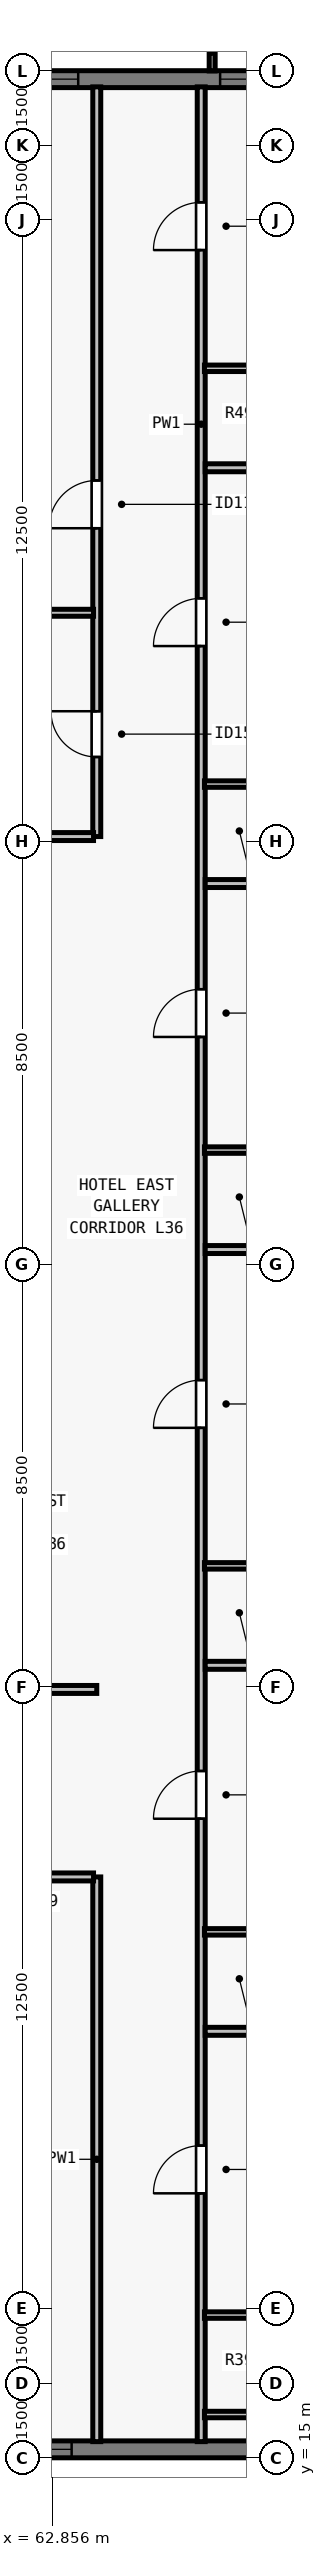
"""IFC4 building model, lengths in metres.
Left out: names, types, materials, properties, quantities, classifications, styles, units other than length and angle.
Written with IfcOpenShell. Run it as: python <this file> out.ifc"""

import sys

from ifc_helpers import new_model, si_unit, direction, frame, frame_2d, origin, place, context, subcontext, project, spatial, rectangle, extrude, element, fill, save


model = new_model("IFC4")
c1 = context("Model", 3, precision=1e-05, world=origin(), true_north=direction((0.0, 1.0)))
c2 = subcontext(c1, "Body", "Model", "MODEL_VIEW")
j1 = project(units=[si_unit("LENGTHUNIT", "METRE"), si_unit("PLANEANGLEUNIT", "RADIAN")], contexts=[c1])
p1 = place(None, origin())
s1 = spatial("IfcSite", under=j1, at=p1, CompositionType="ELEMENT")
p2 = place(p1, origin())
s2 = spatial("IfcBuilding", under=s1, at=p2, CompositionType="ELEMENT")
p3 = place(p2, frame((0.0, 0.0, 134.0)))
s3 = spatial("IfcBuildingStorey", under=s2, at=p3, CompositionType="ELEMENT", Elevation=134.0)
p4 = place(p3, frame((32.0, 62.83, 0.0), z_axis=(0.0, 0.0, 1.0), x_axis=(1.0, 0.0, 0.0)))
e1 = element("IfcWall", 1, at=p4, inside=s3, PredefinedType="SOLIDWALL", context=c2, shape_type="SweptSolid", body=[
    extrude(rectangle(XDim=39.682, YDim=0.34, at=frame_2d((19.841, 0.0))), origin(), (0.0, 0.0, 1.0), 3.28),
])
p5 = place(p4, frame((4.952, 0.0, 0.8)))
e2 = element("IfcOpeningElement", 2, at=p5, cuts=e1, PredefinedType="OPENING", context=c2, shape_type="SweptSolid", body=[
    extrude(rectangle(XDim=1.35, YDim=1.66, at=frame_2d((0.675, 0.83))), frame((0.0, 0.18, 0.0), z_axis=(0.0, -1.0, 0.0), x_axis=(1.0, 0.0, 0.0)), (0.0, 0.0, 1.0), 0.36),
])
p6 = place(p4, frame((12.059, 0.0, 0.8)))
e3 = element("IfcOpeningElement", 3, at=p6, cuts=e1, PredefinedType="OPENING", context=c2, shape_type="SweptSolid", body=[
    extrude(rectangle(XDim=1.35, YDim=1.66, at=frame_2d((0.675, 0.83))), frame((0.0, 0.18, 0.0), z_axis=(0.0, -1.0, 0.0), x_axis=(1.0, 0.0, 0.0)), (0.0, 0.0, 1.0), 0.36),
])
p7 = place(p4, frame((16.262, 0.0, 0.8)))
e4 = element("IfcOpeningElement", 4, at=p7, cuts=e1, PredefinedType="OPENING", context=c2, shape_type="SweptSolid", body=[
    extrude(rectangle(XDim=1.75, YDim=1.66, at=frame_2d((0.875, 0.83))), frame((0.0, 0.18, 0.0), z_axis=(0.0, -1.0, 0.0), x_axis=(1.0, 0.0, 0.0)), (0.0, 0.0, 1.0), 0.36),
])
p8 = place(p4, frame((19.166, 0.0, 0.8)))
e5 = element("IfcOpeningElement", 5, at=p8, cuts=e1, PredefinedType="OPENING", context=c2, shape_type="SweptSolid", body=[
    extrude(rectangle(XDim=1.35, YDim=1.66, at=frame_2d((0.675, 0.83))), frame((0.0, 0.18, 0.0), z_axis=(0.0, -1.0, 0.0), x_axis=(1.0, 0.0, 0.0)), (0.0, 0.0, 1.0), 0.36),
])
p9 = place(p4, frame((22.07, 0.0, 0.8)))
e6 = element("IfcOpeningElement", 6, at=p9, cuts=e1, PredefinedType="OPENING", context=c2, shape_type="SweptSolid", body=[
    extrude(rectangle(XDim=1.75, YDim=1.66, at=frame_2d((0.875, 0.83))), frame((0.0, 0.18, 0.0), z_axis=(0.0, -1.0, 0.0), x_axis=(1.0, 0.0, 0.0)), (0.0, 0.0, 1.0), 0.36),
])
p10 = place(p4, frame((26.273, 0.0, 0.8)))
e7 = element("IfcOpeningElement", 7, at=p10, cuts=e1, PredefinedType="OPENING", context=c2, shape_type="SweptSolid", body=[
    extrude(rectangle(XDim=1.35, YDim=1.66, at=frame_2d((0.675, 0.83))), frame((0.0, 0.18, 0.0), z_axis=(0.0, -1.0, 0.0), x_axis=(1.0, 0.0, 0.0)), (0.0, 0.0, 1.0), 0.36),
])
p11 = place(p4, frame((29.627, 0.0, 0.8)))
e8 = element("IfcOpeningElement", 8, at=p11, cuts=e1, PredefinedType="OPENING", context=c2, shape_type="SweptSolid", body=[
    extrude(rectangle(XDim=1.75, YDim=1.66, at=frame_2d((0.875, 0.83))), frame((0.0, 0.18, 0.0), z_axis=(0.0, -1.0, 0.0), x_axis=(1.0, 0.0, 0.0)), (0.0, 0.0, 1.0), 0.36),
])
p12 = place(p4, frame((34.23, 0.0, 0.8)))
e9 = element("IfcOpeningElement", 9, at=p12, cuts=e1, PredefinedType="OPENING", context=c2, shape_type="SweptSolid", body=[
    extrude(rectangle(XDim=1.35, YDim=1.66, at=frame_2d((0.675, 0.83))), frame((0.0, 0.18, 0.0), z_axis=(0.0, -1.0, 0.0), x_axis=(1.0, 0.0, 0.0)), (0.0, 0.0, 1.0), 0.36),
])
p13 = place(p3, frame((72.0, 15.17, 0.0), z_axis=(0.0, 0.0, 1.0), x_axis=(-1.0, 0.0, 0.0)))
e10 = element("IfcWall", 10, at=p13, inside=s3, PredefinedType="SOLIDWALL", context=c2, shape_type="SweptSolid", body=[
    extrude(rectangle(XDim=39.682, YDim=0.34, at=frame_2d((19.841, 0.0))), origin(), (0.0, 0.0, 1.0), 3.28),
])
p14 = place(p13, frame((8.755, 0.0, 0.8)))
e11 = element("IfcOpeningElement", 11, at=p14, cuts=e10, PredefinedType="OPENING", context=c2, shape_type="SweptSolid", body=[
    extrude(rectangle(XDim=1.75, YDim=1.66, at=frame_2d((0.875, 0.83))), frame((0.0, 0.18, 0.0), z_axis=(0.0, -1.0, 0.0), x_axis=(1.0, 0.0, 0.0)), (0.0, 0.0, 1.0), 0.36),
])
p15 = place(p13, frame((12.059, 0.0, 0.8)))
e12 = element("IfcOpeningElement", 12, at=p15, cuts=e10, PredefinedType="OPENING", context=c2, shape_type="SweptSolid", body=[
    extrude(rectangle(XDim=1.35, YDim=1.66, at=frame_2d((0.675, 0.83))), frame((0.0, 0.18, 0.0), z_axis=(0.0, -1.0, 0.0), x_axis=(1.0, 0.0, 0.0)), (0.0, 0.0, 1.0), 0.36),
])
p16 = place(p13, frame((16.262, 0.0, 0.8)))
e13 = element("IfcOpeningElement", 13, at=p16, cuts=e10, PredefinedType="OPENING", context=c2, shape_type="SweptSolid", body=[
    extrude(rectangle(XDim=1.75, YDim=1.66, at=frame_2d((0.875, 0.83))), frame((0.0, 0.18, 0.0), z_axis=(0.0, -1.0, 0.0), x_axis=(1.0, 0.0, 0.0)), (0.0, 0.0, 1.0), 0.36),
])
p17 = place(p13, frame((19.166, 0.0, 0.8)))
e14 = element("IfcOpeningElement", 14, at=p17, cuts=e10, PredefinedType="OPENING", context=c2, shape_type="SweptSolid", body=[
    extrude(rectangle(XDim=1.35, YDim=1.66, at=frame_2d((0.675, 0.83))), frame((0.0, 0.18, 0.0), z_axis=(0.0, -1.0, 0.0), x_axis=(1.0, 0.0, 0.0)), (0.0, 0.0, 1.0), 0.36),
])
p18 = place(p13, frame((21.27, 0.0, 0.8)))
e15 = element("IfcOpeningElement", 15, at=p18, cuts=e10, PredefinedType="OPENING", context=c2, shape_type="SweptSolid", body=[
    extrude(rectangle(XDim=1.75, YDim=1.66, at=frame_2d((0.875, 0.83))), frame((0.0, 0.18, 0.0), z_axis=(0.0, -1.0, 0.0), x_axis=(1.0, 0.0, 0.0)), (0.0, 0.0, 1.0), 0.36),
])
p19 = place(p13, frame((26.273, 0.0, 0.8)))
e16 = element("IfcOpeningElement", 16, at=p19, cuts=e10, PredefinedType="OPENING", context=c2, shape_type="SweptSolid", body=[
    extrude(rectangle(XDim=1.35, YDim=1.66, at=frame_2d((0.675, 0.83))), frame((0.0, 0.18, 0.0), z_axis=(0.0, -1.0, 0.0), x_axis=(1.0, 0.0, 0.0)), (0.0, 0.0, 1.0), 0.36),
])
p20 = place(p13, frame((28.377, 0.0, 0.8)))
e17 = element("IfcOpeningElement", 17, at=p20, cuts=e10, PredefinedType="OPENING", context=c2, shape_type="SweptSolid", body=[
    extrude(rectangle(XDim=1.75, YDim=1.66, at=frame_2d((0.875, 0.83))), frame((0.0, 0.18, 0.0), z_axis=(0.0, -1.0, 0.0), x_axis=(1.0, 0.0, 0.0)), (0.0, 0.0, 1.0), 0.36),
])
p21 = place(p13, frame((32.93, 0.0, 0.8)))
e18 = element("IfcOpeningElement", 18, at=p21, cuts=e10, PredefinedType="OPENING", context=c2, shape_type="SweptSolid", body=[
    extrude(rectangle(XDim=1.35, YDim=1.66, at=frame_2d((0.675, 0.83))), frame((0.0, 0.18, 0.0), z_axis=(0.0, -1.0, 0.0), x_axis=(1.0, 0.0, 0.0)), (0.0, 0.0, 1.0), 0.36),
])
p22 = place(p3, frame((65.85, 15.325, 0.0), z_axis=(0.0, 0.0, 1.0), x_axis=(0.0, 1.0, 0.0)))
e19 = element("IfcWall", 19, at=p22, inside=s3, PredefinedType="PARTITIONING", context=c2, shape_type="SweptSolid", body=[
    extrude(rectangle(XDim=47.35, YDim=0.16, at=frame_2d((23.675, 0.0))), origin(), (0.0, 0.0, 1.0), 2.555),
])
p23 = place(p22, frame((4.993, 0.0, 0.0)))
e20 = element("IfcOpeningElement", 20, at=p23, cuts=e19, PredefinedType="OPENING", context=c2, shape_type="SweptSolid", body=[
    extrude(rectangle(XDim=0.96, YDim=2.15, at=frame_2d((0.48, 1.075))), frame((0.0, 0.09, 0.0), z_axis=(0.0, -1.0, 0.0), x_axis=(1.0, 0.0, 0.0)), (0.0, 0.0, 1.0), 0.18),
])
p24 = place(p22, frame((12.525, 0.0, 0.0)))
e21 = element("IfcOpeningElement", 21, at=p24, cuts=e19, PredefinedType="OPENING", context=c2, shape_type="SweptSolid", body=[
    extrude(rectangle(XDim=0.96, YDim=2.15, at=frame_2d((0.48, 1.075))), frame((0.0, 0.09, 0.0), z_axis=(0.0, -1.0, 0.0), x_axis=(1.0, 0.0, 0.0)), (0.0, 0.0, 1.0), 0.18),
])
p25 = place(p22, frame((20.385, 0.0, 0.0)))
e22 = element("IfcOpeningElement", 22, at=p25, cuts=e19, PredefinedType="OPENING", context=c2, shape_type="SweptSolid", body=[
    extrude(rectangle(XDim=0.96, YDim=2.15, at=frame_2d((0.48, 1.075))), frame((0.0, 0.09, 0.0), z_axis=(0.0, -1.0, 0.0), x_axis=(1.0, 0.0, 0.0)), (0.0, 0.0, 1.0), 0.18),
])
p26 = place(p22, frame((28.246, 0.0, 0.0)))
e23 = element("IfcOpeningElement", 23, at=p26, cuts=e19, PredefinedType="OPENING", context=c2, shape_type="SweptSolid", body=[
    extrude(rectangle(XDim=0.96, YDim=2.15, at=frame_2d((0.48, 1.075))), frame((0.0, 0.09, 0.0), z_axis=(0.0, -1.0, 0.0), x_axis=(1.0, 0.0, 0.0)), (0.0, 0.0, 1.0), 0.18),
])
p27 = place(p22, frame((36.105, 0.0, 0.0)))
e24 = element("IfcOpeningElement", 24, at=p27, cuts=e19, PredefinedType="OPENING", context=c2, shape_type="SweptSolid", body=[
    extrude(rectangle(XDim=0.96, YDim=2.15, at=frame_2d((0.48, 1.075))), frame((0.0, 0.09, 0.0), z_axis=(0.0, -1.0, 0.0), x_axis=(1.0, 0.0, 0.0)), (0.0, 0.0, 1.0), 0.18),
])
p28 = place(p22, frame((44.068, 0.0, 0.0)))
e25 = element("IfcOpeningElement", 25, at=p28, cuts=e19, PredefinedType="OPENING", context=c2, shape_type="SweptSolid", body=[
    extrude(rectangle(XDim=0.96, YDim=2.15, at=frame_2d((0.48, 1.075))), frame((0.0, 0.09, 0.0), z_axis=(0.0, -1.0, 0.0), x_axis=(1.0, 0.0, 0.0)), (0.0, 0.0, 1.0), 0.18),
])
p29 = place(p3, frame((63.75, 15.325, 0.0), z_axis=(0.0, 0.0, 1.0), x_axis=(0.0, 1.0, 0.0)))
e26 = element("IfcWall", 26, at=p29, inside=s3, PredefinedType="PARTITIONING", context=c2, shape_type="SweptSolid", body=[
    extrude(rectangle(XDim=11.355, YDim=0.16, at=frame_2d((5.677, 0.0))), origin(), (0.0, 0.0, 1.0), 2.555),
])
p30 = place(p3, frame((63.75, 47.6, 0.0), z_axis=(0.0, 0.0, 1.0), x_axis=(0.0, 1.0, 0.0)))
e27 = element("IfcWall", 27, at=p30, inside=s3, PredefinedType="PARTITIONING", context=c2, shape_type="SweptSolid", body=[
    extrude(rectangle(XDim=15.075, YDim=0.16, at=frame_2d((7.538, 0.0))), origin(), (0.0, 0.0, 1.0), 2.555),
])
p31 = place(p30, frame((1.6, 0.0, 0.0)))
e28 = element("IfcOpeningElement", 28, at=p31, cuts=e27, PredefinedType="OPENING", context=c2, shape_type="SweptSolid", body=[
    extrude(rectangle(XDim=0.92, YDim=2.12, at=frame_2d((0.46, 1.06))), frame((0.0, 0.09, 0.0), z_axis=(0.0, -1.0, 0.0), x_axis=(1.0, 0.0, 0.0)), (0.0, 0.0, 1.0), 0.18),
])
p32 = place(p30, frame((6.2, 0.0, 0.0)))
e29 = element("IfcOpeningElement", 29, at=p32, cuts=e27, PredefinedType="OPENING", context=c2, shape_type="SweptSolid", body=[
    extrude(rectangle(XDim=0.96, YDim=2.12, at=frame_2d((0.48, 1.06))), frame((0.0, 0.09, 0.0), z_axis=(0.0, -1.0, 0.0), x_axis=(1.0, 0.0, 0.0)), (0.0, 0.0, 1.0), 0.18),
])
p33 = place(p3, frame((60.765, 30.45, 0.0), z_axis=(0.0, 0.0, 1.0), x_axis=(1.0, 0.0, 0.0)))
e30 = element("IfcWall", 30, at=p33, inside=s3, PredefinedType="PARTITIONING", context=c2, shape_type="SweptSolid", body=[
    extrude(rectangle(XDim=2.985, YDim=0.16, at=frame_2d((1.493, 0.0))), origin(), (0.0, 0.0, 1.0), 3.28),
])
p34 = place(p3, frame((60.765, 47.6, 0.0), z_axis=(0.0, 0.0, 1.0), x_axis=(1.0, 0.0, 0.0)))
e31 = element("IfcWall", 31, at=p34, inside=s3, PredefinedType="PARTITIONING", context=c2, shape_type="SweptSolid", body=[
    extrude(rectangle(XDim=2.92, YDim=0.16, at=frame_2d((1.46, 0.0))), origin(), (0.0, 0.0, 1.0), 3.28),
])
p35 = place(p3, frame((41.615, 26.68, 0.0), z_axis=(0.0, 0.0, 1.0), x_axis=(1.0, 0.0, 0.0)))
e32 = element("IfcWall", 32, at=p35, inside=s3, PredefinedType="PARTITIONING", context=c2, shape_type="SweptSolid", body=[
    extrude(rectangle(XDim=22.07, YDim=0.16, at=frame_2d((11.035, 0.0))), origin(), (0.0, 0.0, 1.0), 3.28),
])
p36 = place(p35, frame((4.281, 0.0, 0.0)))
e33 = element("IfcOpeningElement", 33, at=p36, cuts=e32, PredefinedType="OPENING", context=c2, shape_type="SweptSolid", body=[
    extrude(rectangle(XDim=0.96, YDim=2.15, at=frame_2d((0.48, 1.075))), frame((0.0, 0.09, 0.0), z_axis=(0.0, -1.0, 0.0), x_axis=(1.0, 0.0, 0.0)), (0.0, 0.0, 1.0), 0.18),
])
p37 = place(p35, frame((11.56, 0.0, 0.0)))
e34 = element("IfcOpeningElement", 34, at=p37, cuts=e32, PredefinedType="OPENING", context=c2, shape_type="SweptSolid", body=[
    extrude(rectangle(XDim=0.96, YDim=2.15, at=frame_2d((0.48, 1.075))), frame((0.0, 0.09, 0.0), z_axis=(0.0, -1.0, 0.0), x_axis=(1.0, 0.0, 0.0)), (0.0, 0.0, 1.0), 0.18),
])
p38 = place(p35, frame((19.134, 0.0, 0.0)))
e35 = element("IfcOpeningElement", 35, at=p38, cuts=e32, PredefinedType="OPENING", context=c2, shape_type="SweptSolid", body=[
    extrude(rectangle(XDim=0.96, YDim=2.15, at=frame_2d((0.48, 1.075))), frame((0.0, 0.09, 0.0), z_axis=(0.0, -1.0, 0.0), x_axis=(1.0, 0.0, 0.0)), (0.0, 0.0, 1.0), 0.18),
])
p39 = place(p3, frame((53.555, 52.1, 0.0), z_axis=(0.0, 0.0, 1.0), x_axis=(1.0, 0.0, 0.0)))
e36 = element("IfcWall", 36, at=p39, inside=s3, PredefinedType="PARTITIONING", context=c2, shape_type="SweptSolid", body=[
    extrude(rectangle(XDim=10.13, YDim=0.14, at=frame_2d((5.065, 0.0))), origin(), (0.0, 0.0, 1.0), 3.28),
])
for number, where, z_axis, x_axis in (
    (37, (65.915, 15.87, 0.0), (0.0, 0.0, 1.0), (1.0, 0.0, 0.0)),
    (38, (65.915, 17.87, 0.0), (0.0, 0.0, 1.0), (1.0, 0.0, 0.0)),
):
    element("IfcWall", number, at=place(p3, frame(where, z_axis=z_axis, x_axis=x_axis)), inside=s3, PredefinedType="PLUMBINGWALL", context=c2, shape_type="SweptSolid", body=[
        extrude(rectangle(XDim=2.315, YDim=0.13, at=frame_2d((1.157, 0.0))), origin(), (0.0, 0.0, 1.0), 3.28),
    ])
p40 = place(p3, frame((65.93, 23.576, 0.0), z_axis=(0.0, 0.0, 1.0), x_axis=(1.0, 0.0, 0.0)))
e39 = element("IfcWall", 39, at=p40, inside=s3, PredefinedType="PARTITIONING", context=c2, shape_type="SweptSolid", body=[
    extrude(rectangle(XDim=9.745, YDim=0.16, at=frame_2d((4.873, 0.0))), origin(), (0.0, 0.0, 1.0), 2.896),
])
p41 = place(p3, frame((65.915, 25.576, 0.0), z_axis=(0.0, 0.0, 1.0), x_axis=(1.0, 0.0, 0.0)))
e40 = element("IfcWall", 40, at=p41, inside=s3, PredefinedType="PLUMBINGWALL", context=c2, shape_type="SweptSolid", body=[
    extrude(rectangle(XDim=2.315, YDim=0.13, at=frame_2d((1.157, 0.0))), origin(), (0.0, 0.0, 1.0), 2.896),
])
p42 = place(p3, frame((65.93, 30.935, 0.0), z_axis=(0.0, 0.0, 1.0), x_axis=(1.0, 0.0, 0.0)))
e41 = element("IfcWall", 41, at=p42, inside=s3, PredefinedType="PARTITIONING", context=c2, shape_type="SweptSolid", body=[
    extrude(rectangle(XDim=9.745, YDim=0.16, at=frame_2d((4.873, 0.0))), origin(), (0.0, 0.0, 1.0), 3.28),
])
p43 = place(p3, frame((65.915, 32.935, 0.0), z_axis=(0.0, 0.0, 1.0), x_axis=(1.0, 0.0, 0.0)))
e42 = element("IfcWall", 42, at=p43, inside=s3, PredefinedType="PLUMBINGWALL", context=c2, shape_type="SweptSolid", body=[
    extrude(rectangle(XDim=2.315, YDim=0.13, at=frame_2d((1.157, 0.0))), origin(), (0.0, 0.0, 1.0), 3.28),
])
p44 = place(p3, frame((65.93, 39.296, 0.0), z_axis=(0.0, 0.0, 1.0), x_axis=(1.0, 0.0, 0.0)))
e43 = element("IfcWall", 43, at=p44, inside=s3, PredefinedType="PARTITIONING", context=c2, shape_type="SweptSolid", body=[
    extrude(rectangle(XDim=9.745, YDim=0.16, at=frame_2d((4.873, 0.0))), origin(), (0.0, 0.0, 1.0), 3.28),
])
p45 = place(p3, frame((65.915, 41.296, 0.0), z_axis=(0.0, 0.0, 1.0), x_axis=(1.0, 0.0, 0.0)))
e44 = element("IfcWall", 44, at=p45, inside=s3, PredefinedType="PLUMBINGWALL", context=c2, shape_type="SweptSolid", body=[
    extrude(rectangle(XDim=2.315, YDim=0.13, at=frame_2d((1.157, 0.0))), origin(), (0.0, 0.0, 1.0), 3.28),
])
p46 = place(p3, frame((65.93, 46.655, 0.0), z_axis=(0.0, 0.0, 1.0), x_axis=(1.0, 0.0, 0.0)))
e45 = element("IfcWall", 45, at=p46, inside=s3, PredefinedType="PARTITIONING", context=c2, shape_type="SweptSolid", body=[
    extrude(rectangle(XDim=9.745, YDim=0.16, at=frame_2d((4.873, 0.0))), origin(), (0.0, 0.0, 1.0), 3.28),
])
p47 = place(p3, frame((65.915, 48.655, 0.0), z_axis=(0.0, 0.0, 1.0), x_axis=(1.0, 0.0, 0.0)))
e46 = element("IfcWall", 46, at=p47, inside=s3, PredefinedType="PLUMBINGWALL", context=c2, shape_type="SweptSolid", body=[
    extrude(rectangle(XDim=2.315, YDim=0.13, at=frame_2d((1.157, 0.0))), origin(), (0.0, 0.0, 1.0), 3.28),
])
p48 = place(p3, frame((65.93, 55.016, 0.0), z_axis=(0.0, 0.0, 1.0), x_axis=(1.0, 0.0, 0.0)))
e47 = element("IfcWall", 47, at=p48, inside=s3, PredefinedType="PARTITIONING", context=c2, shape_type="SweptSolid", body=[
    extrude(rectangle(XDim=9.745, YDim=0.16, at=frame_2d((4.873, 0.0))), origin(), (0.0, 0.0, 1.0), 2.896),
])
p49 = place(p3, frame((65.915, 57.016, 0.0), z_axis=(0.0, 0.0, 1.0), x_axis=(1.0, 0.0, 0.0)))
e48 = element("IfcWall", 48, at=p49, inside=s3, PredefinedType="PLUMBINGWALL", context=c2, shape_type="SweptSolid", body=[
    extrude(rectangle(XDim=2.315, YDim=0.13, at=frame_2d((1.157, 0.0))), origin(), (0.0, 0.0, 1.0), 3.28),
])
p50 = place(p11, origin())
e49 = element("IfcWindow", 49, at=p50, inside=s3, PartitioningType="SINGLE_PANEL", PredefinedType="WINDOW", context=c2, shape_type="SweptSolid", body=[
    extrude(rectangle(XDim=1.75, YDim=1.66, at=frame_2d((0.875, 0.83))), frame((0.0, -0.05, 0.0), z_axis=(0.0, -1.0, 0.0), x_axis=(1.0, 0.0, 0.0)), (0.0, 0.0, 1.0), 0.06),
])
fill(e8, e49)
p51 = place(p12, origin())
e50 = element("IfcWindow", 50, at=p51, inside=s3, PartitioningType="SINGLE_PANEL", PredefinedType="WINDOW", context=c2, shape_type="SweptSolid", body=[
    extrude(rectangle(XDim=1.35, YDim=1.66, at=frame_2d((0.675, 0.83))), frame((0.0, -0.05, 0.0), z_axis=(0.0, -1.0, 0.0), x_axis=(1.0, 0.0, 0.0)), (0.0, 0.0, 1.0), 0.06),
])
fill(e9, e50)
p52 = place(p14, origin())
e51 = element("IfcWindow", 51, at=p52, inside=s3, PartitioningType="SINGLE_PANEL", PredefinedType="WINDOW", context=c2, shape_type="SweptSolid", body=[
    extrude(rectangle(XDim=1.75, YDim=1.66, at=frame_2d((0.875, 0.83))), frame((0.0, -0.05, 0.0), z_axis=(0.0, -1.0, 0.0), x_axis=(1.0, 0.0, 0.0)), (0.0, 0.0, 1.0), 0.06),
])
fill(e11, e51)
p53 = place(p31, origin())
e52 = element("IfcDoor", 52, at=p53, inside=s3, OperationType="SINGLE_SWING_RIGHT", PredefinedType="DOOR", context=c2, shape_type="SweptSolid", body=[
    extrude(rectangle(XDim=0.92, YDim=2.12, at=frame_2d((0.46, 1.06))), frame((0.0, 0.025, 0.0), z_axis=(0.0, -1.0, 0.0), x_axis=(1.0, 0.0, 0.0)), (0.0, 0.0, 1.0), 0.05),
])
fill(e28, e52)
p54 = place(p32, origin())
e53 = element("IfcDoor", 53, at=p54, inside=s3, OperationType="SINGLE_SWING_LEFT", PredefinedType="DOOR", context=c2, shape_type="SweptSolid", body=[
    extrude(rectangle(XDim=0.96, YDim=2.12, at=frame_2d((0.48, 1.06))), frame((0.0, 0.025, 0.0), z_axis=(0.0, -1.0, 0.0), x_axis=(1.0, 0.0, 0.0)), (0.0, 0.0, 1.0), 0.05),
])
fill(e29, e53)
p55 = place(p23, origin())
e54 = element("IfcDoor", 54, at=p55, inside=s3, OperationType="SINGLE_SWING_LEFT", PredefinedType="DOOR", context=c2, shape_type="SweptSolid", body=[
    extrude(rectangle(XDim=0.96, YDim=2.15, at=frame_2d((0.48, 1.075))), frame((0.0, 0.025, 0.0), z_axis=(0.0, -1.0, 0.0), x_axis=(1.0, 0.0, 0.0)), (0.0, 0.0, 1.0), 0.05),
])
fill(e20, e54)
p56 = place(p24, origin())
e55 = element("IfcDoor", 55, at=p56, inside=s3, OperationType="SINGLE_SWING_LEFT", PredefinedType="DOOR", context=c2, shape_type="SweptSolid", body=[
    extrude(rectangle(XDim=0.96, YDim=2.15, at=frame_2d((0.48, 1.075))), frame((0.0, 0.025, 0.0), z_axis=(0.0, -1.0, 0.0), x_axis=(1.0, 0.0, 0.0)), (0.0, 0.0, 1.0), 0.05),
])
fill(e21, e55)
p57 = place(p25, origin())
e56 = element("IfcDoor", 56, at=p57, inside=s3, OperationType="SINGLE_SWING_LEFT", PredefinedType="DOOR", context=c2, shape_type="SweptSolid", body=[
    extrude(rectangle(XDim=0.96, YDim=2.15, at=frame_2d((0.48, 1.075))), frame((0.0, 0.025, 0.0), z_axis=(0.0, -1.0, 0.0), x_axis=(1.0, 0.0, 0.0)), (0.0, 0.0, 1.0), 0.05),
])
fill(e22, e56)
p58 = place(p26, origin())
e57 = element("IfcDoor", 57, at=p58, inside=s3, OperationType="SINGLE_SWING_LEFT", PredefinedType="DOOR", context=c2, shape_type="SweptSolid", body=[
    extrude(rectangle(XDim=0.96, YDim=2.15, at=frame_2d((0.48, 1.075))), frame((0.0, 0.025, 0.0), z_axis=(0.0, -1.0, 0.0), x_axis=(1.0, 0.0, 0.0)), (0.0, 0.0, 1.0), 0.05),
])
fill(e23, e57)
p59 = place(p27, origin())
e58 = element("IfcDoor", 58, at=p59, inside=s3, OperationType="SINGLE_SWING_LEFT", PredefinedType="DOOR", context=c2, shape_type="SweptSolid", body=[
    extrude(rectangle(XDim=0.96, YDim=2.15, at=frame_2d((0.48, 1.075))), frame((0.0, 0.025, 0.0), z_axis=(0.0, -1.0, 0.0), x_axis=(1.0, 0.0, 0.0)), (0.0, 0.0, 1.0), 0.05),
])
fill(e24, e58)
p60 = place(p28, origin())
e59 = element("IfcDoor", 59, at=p60, inside=s3, OperationType="SINGLE_SWING_LEFT", PredefinedType="DOOR", context=c2, shape_type="SweptSolid", body=[
    extrude(rectangle(XDim=0.96, YDim=2.15, at=frame_2d((0.48, 1.075))), frame((0.0, 0.025, 0.0), z_axis=(0.0, -1.0, 0.0), x_axis=(1.0, 0.0, 0.0)), (0.0, 0.0, 1.0), 0.05),
])
fill(e25, e59)
save(model, sys.argv[1])
